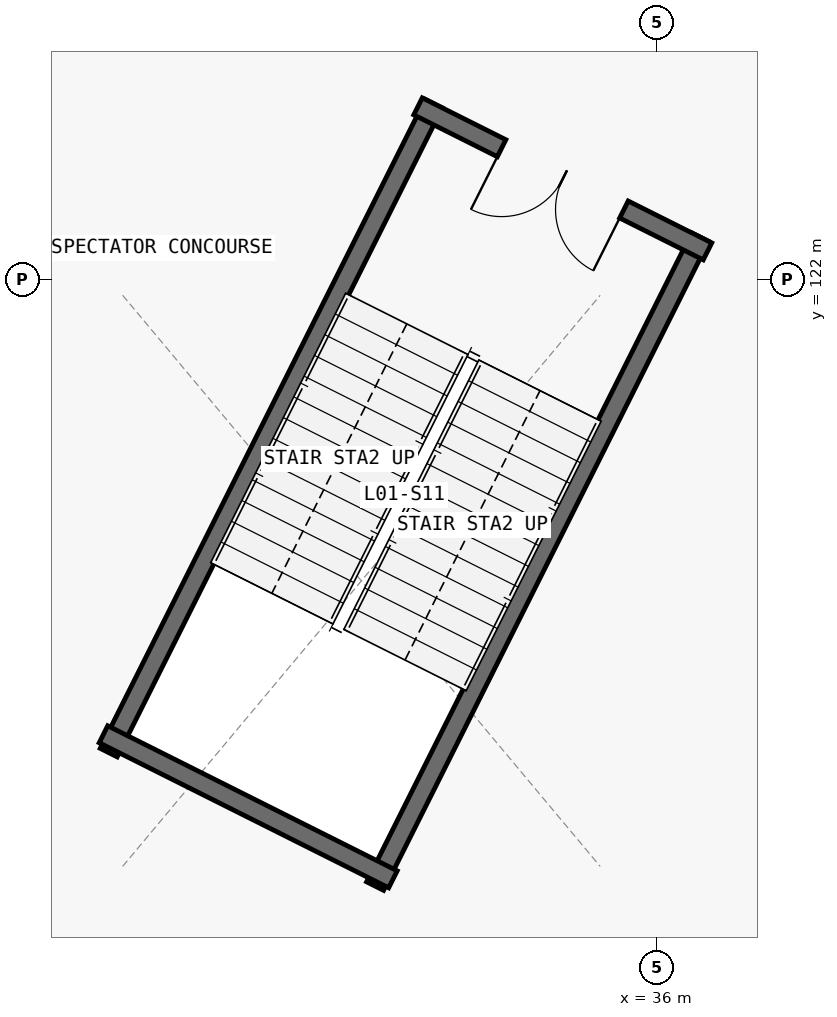
"""IFC4 building model, lengths in metres.
Left out: names, types, materials, properties, quantities, classifications, styles, units other than length and angle.
Written with IfcOpenShell. Run it as: python <this file> out.ifc"""

import sys

from ifc_helpers import new_model, si_unit, direction, frame, frame_2d, origin, place, context, subcontext, project, spatial, rectangle, extrude, element, fill, save


model = new_model("IFC4")
c1 = context("Model", 3, precision=1e-05, world=origin(), true_north=direction((0.0, 1.0)))
c2 = subcontext(c1, "Body", "Model", "MODEL_VIEW")
j1 = project(units=[si_unit("LENGTHUNIT", "METRE"), si_unit("PLANEANGLEUNIT", "RADIAN")], contexts=[c1])
p1 = place(None, origin())
s1 = spatial("IfcSite", under=j1, at=p1, CompositionType="ELEMENT")
p2 = place(p1, origin())
s2 = spatial("IfcBuilding", under=s1, at=p2, CompositionType="ELEMENT")
p3 = place(p2, frame((0.0, 0.0, 5.4)))
s3 = spatial("IfcBuildingStorey", under=s2, at=p3, CompositionType="ELEMENT", Elevation=5.4)
p4 = place(p3, frame((33.063, 124.313, 0.0), z_axis=(0.0, 0.0, 1.0), x_axis=(-0.447919041961, -0.894074119885, 0.0)))
e1 = element("IfcWall", 1, at=p4, inside=s3, PredefinedType="SHEAR", context=c2, shape_type="SweptSolid", body=[
    extrude(rectangle(XDim=9.55, YDim=0.25, at=frame_2d((4.775, 0.0))), origin(), (0.0, 0.0, 1.0), 4.52),
])
p5 = place(p3, frame((32.291, 114.019, 0.0), z_axis=(0.0, 0.0, 1.0), x_axis=(0.4479088042, 0.894079248792, 0.0)))
e2 = element("IfcWall", 2, at=p5, inside=s3, PredefinedType="SHEAR", context=c2, shape_type="SweptSolid", body=[
    extrude(rectangle(XDim=9.55, YDim=0.25, at=frame_2d((4.775, 0.0))), origin(), (0.0, 0.0, 1.0), 4.52),
])
p6 = place(p3, frame((36.664, 122.37, 0.0), z_axis=(0.0, 0.0, 1.0), x_axis=(-0.894071595331, 0.447924081092, 0.0)))
e3 = element("IfcWall", 3, at=p6, inside=s3, PredefinedType="SHEAR", context=c2, shape_type="SweptSolid", body=[
    extrude(rectangle(XDim=4.26, YDim=0.25, at=frame_2d((2.13, 0.0))), origin(), (0.0, 0.0, 1.0), 4.52),
])
p7 = place(p6, frame((1.23, 0.0, 0.0)))
e4 = element("IfcOpeningElement", 4, at=p7, cuts=e3, PredefinedType="OPENING", context=c2, shape_type="SweptSolid", body=[
    extrude(rectangle(XDim=1.8, YDim=2.25, at=frame_2d((0.9, 1.125))), frame((0.0, 0.135, 0.0), z_axis=(0.0, -1.0, 0.0), x_axis=(1.0, 0.0, 0.0)), (0.0, 0.0, 1.0), 0.27),
])
p8 = place(p3, frame((28.717, 116.016, 0.0), z_axis=(0.0, 0.0, 1.0), x_axis=(0.894083048484, -0.447901219481, 0.0)))
e5 = element("IfcWall", 5, at=p8, inside=s3, PredefinedType="SHEAR", context=c2, shape_type="SweptSolid", body=[
    extrude(rectangle(XDim=4.26, YDim=0.25, at=frame_2d((2.13, 0.0))), origin(), (0.0, 0.0, 1.0), 4.52),
])
p9 = place(p7, origin())
e6 = element("IfcDoor", 6, at=p9, inside=s3, OperationType="DOUBLE_DOOR_SINGLE_SWING", PredefinedType="DOOR", context=c2, shape_type="SweptSolid", body=[
    extrude(rectangle(XDim=1.8, YDim=2.25, at=frame_2d((0.9, 1.125))), frame((0.0, 0.025, 0.0), z_axis=(0.0, -1.0, 0.0), x_axis=(1.0, 0.0, 0.0)), (0.0, 0.0, 1.0), 0.05),
])
fill(e4, e6)
save(model, sys.argv[1])
